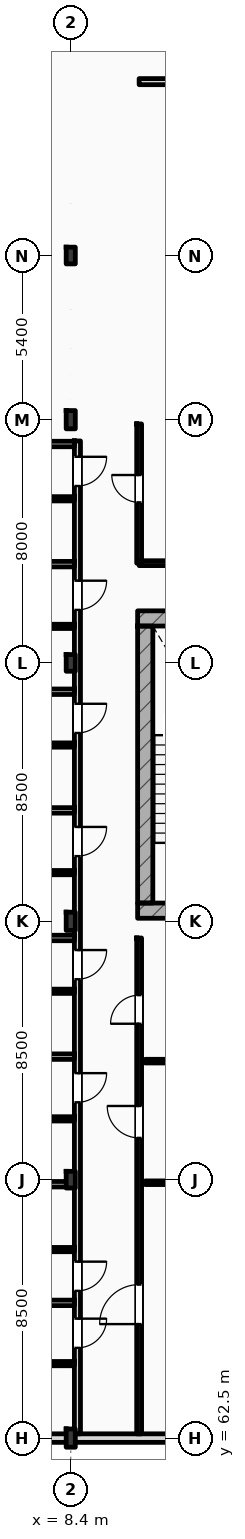
"""IFC4 building model, lengths in metres.
Left out: names, types, materials, properties, quantities, classifications, styles, units other than length and angle.
Written with IfcOpenShell. Run it as: python <this file> out.ifc"""

import sys

from ifc_helpers import new_model, si_unit, direction, frame, frame_2d, origin, origin_2d, place, context, subcontext, project, spatial, rectangle, i_section, extrude, element, fill, save


model = new_model("IFC4")
c1 = context("Model", 3, precision=1e-05, world=origin(), true_north=direction((0.0, 1.0)))
c2 = subcontext(c1, "Body", "Model", "MODEL_VIEW")
j1 = project(units=[si_unit("LENGTHUNIT", "METRE"), si_unit("PLANEANGLEUNIT", "RADIAN")], contexts=[c1])
p1 = place(None, origin())
s1 = spatial("IfcSite", under=j1, at=p1, CompositionType="ELEMENT")
p2 = place(p1, origin())
s2 = spatial("IfcBuilding", under=s1, at=p2, CompositionType="ELEMENT")
p3 = place(p2, frame((0.0, 0.0, 16.2)))
s3 = spatial("IfcBuildingStorey", under=s2, at=p3, CompositionType="ELEMENT", Elevation=16.2)
p4 = place(p3, frame((8.4, 62.5, 0.0), z_axis=(0.0, 0.0, 1.0), x_axis=(1.0, 0.0, 0.0)))
e1 = element("IfcColumn", 1, at=p4, inside=s3, PredefinedType="COLUMN", context=c2, shape_type="SweptSolid", body=[
    extrude(i_section(OverallWidth=0.3, OverallDepth=0.6, WebThickness=0.015, FlangeThickness=0.03, FilletRadius=0.027, at=origin_2d()), origin(), (0.0, 0.0, 1.0), 4.2),
])
p5 = place(p3, frame((8.4, 71.0, 0.0), z_axis=(0.0, 0.0, 1.0), x_axis=(1.0, 0.0, 0.0)))
e2 = element("IfcColumn", 2, at=p5, inside=s3, PredefinedType="COLUMN", context=c2, shape_type="SweptSolid", body=[
    extrude(i_section(OverallWidth=0.3, OverallDepth=0.55, WebThickness=0.015, FlangeThickness=0.029, FilletRadius=0.027, at=origin_2d()), origin(), (0.0, 0.0, 1.0), 4.2),
])
p6 = place(p3, frame((8.4, 79.5, 0.0), z_axis=(0.0, 0.0, 1.0), x_axis=(1.0, 0.0, 0.0)))
e3 = element("IfcColumn", 3, at=p6, inside=s3, PredefinedType="COLUMN", context=c2, shape_type="SweptSolid", body=[
    extrude(i_section(OverallWidth=0.3, OverallDepth=0.6, WebThickness=0.015, FlangeThickness=0.03, FilletRadius=0.027, at=origin_2d()), origin(), (0.0, 0.0, 1.0), 4.2),
])
p7 = place(p3, frame((8.4, 88.0, 0.0), z_axis=(0.0, 0.0, 1.0), x_axis=(1.0, 0.0, 0.0)))
e4 = element("IfcColumn", 4, at=p7, inside=s3, PredefinedType="COLUMN", context=c2, shape_type="SweptSolid", body=[
    extrude(i_section(OverallWidth=0.3, OverallDepth=0.55, WebThickness=0.015, FlangeThickness=0.029, FilletRadius=0.027, at=origin_2d()), origin(), (0.0, 0.0, 1.0), 4.2),
])
p8 = place(p3, frame((8.4, 96.0, 0.0), z_axis=(0.0, 0.0, 1.0), x_axis=(1.0, 0.0, 0.0)))
e5 = element("IfcColumn", 5, at=p8, inside=s3, PredefinedType="COLUMN", context=c2, shape_type="SweptSolid", body=[
    extrude(i_section(OverallWidth=0.3, OverallDepth=0.6, WebThickness=0.015, FlangeThickness=0.03, FilletRadius=0.027, at=origin_2d()), origin(), (0.0, 0.0, 1.0), 4.2),
])
p9 = place(p3, frame((8.4, 101.4, 0.0), z_axis=(0.0, 0.0, 1.0), x_axis=(1.0, 0.0, 0.0)))
e6 = element("IfcColumn", 6, at=p9, inside=s3, PredefinedType="COLUMN", context=c2, shape_type="SweptSolid", body=[
    extrude(i_section(OverallWidth=0.3, OverallDepth=0.55, WebThickness=0.015, FlangeThickness=0.029, FilletRadius=0.027, at=origin_2d()), origin(), (0.0, 0.0, 1.0), 4.2),
])
for number, where, z_axis, x_axis in (
    (7, (10.6, 89.462, 0.0), (0.0, 0.0, 1.0), (1.0, 0.0, 0.0)),
    (8, (10.6, 79.85, 0.0), (0.0, 0.0, 1.0), (1.0, 0.0, 0.0)),
):
    element("IfcWall", number, at=place(p3, frame(where, z_axis=z_axis, x_axis=x_axis)), inside=s3, PredefinedType="SHEAR", context=c2, shape_type="SweptSolid", body=[
        extrude(rectangle(XDim=5.16, YDim=0.5, at=frame_2d((2.58, 0.0))), origin(), (0.0, 0.0, 1.0), 4.2),
    ])
p10 = place(p3, frame((10.85, 80.1, 0.0), z_axis=(0.0, 0.0, 1.0), x_axis=(0.0, 1.0, 0.0)))
e9 = element("IfcWall", 9, at=p10, inside=s3, PredefinedType="SHEAR", context=c2, shape_type="SweptSolid", body=[
    extrude(rectangle(XDim=9.112, YDim=0.5, at=frame_2d((4.556, 0.0))), origin(), (0.0, 0.0, 1.0), 4.2),
])
p11 = place(p3, frame((0.0, 62.5, 0.0), z_axis=(0.0, 0.0, 1.0), x_axis=(1.0, 0.0, 0.0)))
e10 = element("IfcWall", 10, at=p11, inside=s3, PredefinedType="STANDARD", context=c2, shape_type="SweptSolid", body=[
    extrude(rectangle(XDim=25.2, YDim=0.28, at=frame_2d((12.6, 0.0))), origin(), (0.0, 0.0, 1.0), 3.36),
])
p12 = place(p3, frame((10.65, 107.12, 0.0), z_axis=(0.0, 0.0, 1.0), x_axis=(1.0, 0.0, 0.0)))
e11 = element("IfcWall", 11, at=p12, inside=s3, PredefinedType="PARTITIONING", context=c2, shape_type="SweptSolid", body=[
    extrude(rectangle(XDim=14.8, YDim=0.2, at=frame_2d((7.4, 0.0))), origin(), (0.0, 0.0, 1.0), 3.92),
])
p13 = place(p12, frame((8.5, 0.0, 0.0)))
e12 = element("IfcOpeningElement", 12, at=p13, cuts=e11, PredefinedType="OPENING", context=c2, shape_type="SweptSolid", body=[
    extrude(rectangle(XDim=1.25, YDim=2.15, at=frame_2d((0.625, 1.075))), frame((0.0, 0.11, 0.0), z_axis=(0.0, -1.0, 0.0), x_axis=(1.0, 0.0, 0.0)), (0.0, 0.0, 1.0), 0.22),
])
p14 = place(p3, frame((8.62, 62.64, 0.0), z_axis=(0.0, 0.0, 1.0), x_axis=(0.0, 1.0, 0.0)))
e13 = element("IfcWall", 13, at=p14, inside=s3, PredefinedType="PARTITIONING", context=c2, shape_type="SweptSolid", body=[
    extrude(rectangle(XDim=32.66, YDim=0.2, at=frame_2d((16.33, 0.0))), origin(), (0.0, 0.0, 1.0), 3.51),
])
p15 = place(p14, frame((2.829, 0.0, 0.0)))
e14 = element("IfcOpeningElement", 14, at=p15, cuts=e13, PredefinedType="OPENING", context=c2, shape_type="SweptSolid", body=[
    extrude(rectangle(XDim=0.96, YDim=2.2, at=frame_2d((0.48, 1.1))), frame((0.0, 0.11, 0.0), z_axis=(0.0, -1.0, 0.0), x_axis=(1.0, 0.0, 0.0)), (0.0, 0.0, 1.0), 0.22),
])
p16 = place(p14, frame((4.704, 0.0, 0.0)))
e15 = element("IfcOpeningElement", 15, at=p16, cuts=e13, PredefinedType="OPENING", context=c2, shape_type="SweptSolid", body=[
    extrude(rectangle(XDim=0.96, YDim=2.2, at=frame_2d((0.48, 1.1))), frame((0.0, 0.11, 0.0), z_axis=(0.0, -1.0, 0.0), x_axis=(1.0, 0.0, 0.0)), (0.0, 0.0, 1.0), 0.22),
])
p17 = place(p14, frame((10.905, 0.0, 0.0)))
e16 = element("IfcOpeningElement", 16, at=p17, cuts=e13, PredefinedType="OPENING", context=c2, shape_type="SweptSolid", body=[
    extrude(rectangle(XDim=0.96, YDim=2.2, at=frame_2d((0.48, 1.1))), frame((0.0, 0.11, 0.0), z_axis=(0.0, -1.0, 0.0), x_axis=(1.0, 0.0, 0.0)), (0.0, 0.0, 1.0), 0.22),
])
p18 = place(p14, frame((14.954, 0.0, 0.0)))
e17 = element("IfcOpeningElement", 17, at=p18, cuts=e13, PredefinedType="OPENING", context=c2, shape_type="SweptSolid", body=[
    extrude(rectangle(XDim=0.96, YDim=2.2, at=frame_2d((0.48, 1.1))), frame((0.0, 0.11, 0.0), z_axis=(0.0, -1.0, 0.0), x_axis=(1.0, 0.0, 0.0)), (0.0, 0.0, 1.0), 0.22),
])
p19 = place(p14, frame((19.004, 0.0, 0.0)))
e18 = element("IfcOpeningElement", 18, at=p19, cuts=e13, PredefinedType="OPENING", context=c2, shape_type="SweptSolid", body=[
    extrude(rectangle(XDim=0.96, YDim=2.2, at=frame_2d((0.48, 1.1))), frame((0.0, 0.11, 0.0), z_axis=(0.0, -1.0, 0.0), x_axis=(1.0, 0.0, 0.0)), (0.0, 0.0, 1.0), 0.22),
])
p20 = place(p14, frame((23.055, 0.0, 0.0)))
e19 = element("IfcOpeningElement", 19, at=p20, cuts=e13, PredefinedType="OPENING", context=c2, shape_type="SweptSolid", body=[
    extrude(rectangle(XDim=0.96, YDim=2.2, at=frame_2d((0.48, 1.1))), frame((0.0, 0.11, 0.0), z_axis=(0.0, -1.0, 0.0), x_axis=(1.0, 0.0, 0.0)), (0.0, 0.0, 1.0), 0.22),
])
p21 = place(p14, frame((27.104, 0.0, 0.0)))
e20 = element("IfcOpeningElement", 20, at=p21, cuts=e13, PredefinedType="OPENING", context=c2, shape_type="SweptSolid", body=[
    extrude(rectangle(XDim=0.96, YDim=2.2, at=frame_2d((0.48, 1.1))), frame((0.0, 0.11, 0.0), z_axis=(0.0, -1.0, 0.0), x_axis=(1.0, 0.0, 0.0)), (0.0, 0.0, 1.0), 0.22),
])
p22 = place(p14, frame((31.179, 0.0, 0.0)))
e21 = element("IfcOpeningElement", 21, at=p22, cuts=e13, PredefinedType="OPENING", context=c2, shape_type="SweptSolid", body=[
    extrude(rectangle(XDim=0.96, YDim=2.2, at=frame_2d((0.48, 1.1))), frame((0.0, 0.11, 0.0), z_axis=(0.0, -1.0, 0.0), x_axis=(1.0, 0.0, 0.0)), (0.0, 0.0, 1.0), 0.22),
])
p23 = place(p3, frame((10.65, 62.64, 0.0), z_axis=(0.0, 0.0, 1.0), x_axis=(0.0, 1.0, 0.0)))
e22 = element("IfcWall", 22, at=p23, inside=s3, PredefinedType="PARTITIONING", context=c2, shape_type="SweptSolid", body=[
    extrude(rectangle(XDim=16.31, YDim=0.16, at=frame_2d((8.155, 0.0))), origin(), (0.0, 0.0, 1.0), 3.92),
])
p24 = place(p23, frame((3.61, 0.0, 0.0)))
e23 = element("IfcOpeningElement", 23, at=p24, cuts=e22, PredefinedType="OPENING", context=c2, shape_type="SweptSolid", body=[
    extrude(rectangle(XDim=1.3, YDim=2.2, at=frame_2d((0.65, 1.1))), frame((0.0, 0.09, 0.0), z_axis=(0.0, -1.0, 0.0), x_axis=(1.0, 0.0, 0.0)), (0.0, 0.0, 1.0), 0.18),
])
p25 = place(p23, frame((9.735, 0.0, 0.0)))
e24 = element("IfcOpeningElement", 24, at=p25, cuts=e22, PredefinedType="OPENING", context=c2, shape_type="SweptSolid", body=[
    extrude(rectangle(XDim=1.05, YDim=2.12, at=frame_2d((0.525, 1.06))), frame((0.0, 0.09, 0.0), z_axis=(0.0, -1.0, 0.0), x_axis=(1.0, 0.0, 0.0)), (0.0, 0.0, 1.0), 0.18),
])
p26 = place(p23, frame((13.49, 0.0, 0.0)))
e25 = element("IfcOpeningElement", 25, at=p26, cuts=e22, PredefinedType="OPENING", context=c2, shape_type="SweptSolid", body=[
    extrude(rectangle(XDim=0.94, YDim=2.15, at=frame_2d((0.47, 1.075))), frame((0.0, 0.09, 0.0), z_axis=(0.0, -1.0, 0.0), x_axis=(1.0, 0.0, 0.0)), (0.0, 0.0, 1.0), 0.18),
])
p27 = place(p3, frame((10.65, 91.28, 0.0), z_axis=(0.0, 0.0, 1.0), x_axis=(0.0, 1.0, 0.0)))
e26 = element("IfcWall", 26, at=p27, inside=s3, PredefinedType="PARTITIONING", context=c2, shape_type="SweptSolid", body=[
    extrude(rectangle(XDim=4.58, YDim=0.16, at=frame_2d((2.29, 0.0))), origin(), (0.0, 0.0, 1.0), 3.92),
])
p28 = place(p27, frame((2.0, 0.0, 0.0)))
e27 = element("IfcOpeningElement", 27, at=p28, cuts=e26, PredefinedType="OPENING", context=c2, shape_type="SweptSolid", body=[
    extrude(rectangle(XDim=0.9, YDim=2.1, at=frame_2d((0.45, 1.05))), frame((0.0, 0.09, 0.0), z_axis=(0.0, -1.0, 0.0), x_axis=(1.0, 0.0, 0.0)), (0.0, 0.0, 1.0), 0.18),
])
p29 = place(p3, frame((10.65, 91.28, 0.0), z_axis=(0.0, 0.0, 1.0), x_axis=(1.0, 0.0, 0.0)))
e28 = element("IfcWall", 28, at=p29, inside=s3, PredefinedType="PARTITIONING", context=c2, shape_type="SweptSolid", body=[
    extrude(rectangle(XDim=6.9, YDim=0.16, at=frame_2d((3.45, 0.0))), origin(), (0.0, 0.0, 1.0), 3.92),
])
p30 = place(p3, frame((0.15, 66.948, 0.0), z_axis=(0.0, 0.0, 1.0), x_axis=(1.0, 0.0, 0.0)))
e29 = element("IfcWall", 29, at=p30, inside=s3, PredefinedType="PARTITIONING", context=c2, shape_type="SweptSolid", body=[
    extrude(rectangle(XDim=8.37, YDim=0.18, at=frame_2d((4.185, 0.0))), origin(), (0.0, 0.0, 1.0), 3.92),
])
p31 = place(p3, frame((5.05, 64.95, 0.0), z_axis=(0.0, 0.0, 1.0), x_axis=(1.0, 0.0, 0.0)))
e30 = element("IfcWall", 30, at=p31, inside=s3, PredefinedType="PARTITIONING", context=c2, shape_type="SweptSolid", body=[
    extrude(rectangle(XDim=3.47, YDim=0.14, at=frame_2d((1.735, 0.0))), origin(), (0.0, 0.0, 1.0), 3.92),
])
p32 = place(p3, frame((0.15, 70.851, 0.0), z_axis=(0.0, 0.0, 1.0), x_axis=(1.0, 0.0, 0.0)))
e31 = element("IfcWall", 31, at=p32, inside=s3, PredefinedType="PARTITIONING", context=c2, shape_type="SweptSolid", body=[
    extrude(rectangle(XDim=8.37, YDim=0.18, at=frame_2d((4.185, 0.0))), origin(), (0.0, 0.0, 1.0), 3.36),
])
p33 = place(p3, frame((5.05, 68.701, 0.0), z_axis=(0.0, 0.0, 1.0), x_axis=(1.0, 0.0, 0.0)))
e32 = element("IfcWall", 32, at=p33, inside=s3, PredefinedType="PARTITIONING", context=c2, shape_type="SweptSolid", body=[
    extrude(rectangle(XDim=3.47, YDim=0.14, at=frame_2d((1.735, 0.0))), origin(), (0.0, 0.0, 1.0), 3.92),
])
p34 = place(p3, frame((0.15, 75.048, 0.0), z_axis=(0.0, 0.0, 1.0), x_axis=(1.0, 0.0, 0.0)))
e33 = element("IfcWall", 33, at=p34, inside=s3, PredefinedType="PARTITIONING", context=c2, shape_type="SweptSolid", body=[
    extrude(rectangle(XDim=8.37, YDim=0.18, at=frame_2d((4.185, 0.0))), origin(), (0.0, 0.0, 1.0), 3.92),
])
p35 = place(p3, frame((5.05, 73.001, 0.0), z_axis=(0.0, 0.0, 1.0), x_axis=(1.0, 0.0, 0.0)))
e34 = element("IfcWall", 34, at=p35, inside=s3, PredefinedType="PARTITIONING", context=c2, shape_type="SweptSolid", body=[
    extrude(rectangle(XDim=3.47, YDim=0.14, at=frame_2d((1.735, 0.0))), origin(), (0.0, 0.0, 1.0), 3.92),
])
p36 = place(p3, frame((0.15, 78.951, 0.0), z_axis=(0.0, 0.0, 1.0), x_axis=(1.0, 0.0, 0.0)))
e35 = element("IfcWall", 35, at=p36, inside=s3, PredefinedType="PARTITIONING", context=c2, shape_type="SweptSolid", body=[
    extrude(rectangle(XDim=8.37, YDim=0.18, at=frame_2d((4.185, 0.0))), origin(), (0.0, 0.0, 1.0), 3.92),
])
p37 = place(p3, frame((5.05, 77.198, 0.0), z_axis=(0.0, 0.0, 1.0), x_axis=(1.0, 0.0, 0.0)))
e36 = element("IfcWall", 36, at=p37, inside=s3, PredefinedType="PARTITIONING", context=c2, shape_type="SweptSolid", body=[
    extrude(rectangle(XDim=3.47, YDim=0.14, at=frame_2d((1.735, 0.0))), origin(), (0.0, 0.0, 1.0), 3.92),
])
p38 = place(p3, frame((0.15, 83.148, 0.0), z_axis=(0.0, 0.0, 1.0), x_axis=(1.0, 0.0, 0.0)))
e37 = element("IfcWall", 37, at=p38, inside=s3, PredefinedType="PARTITIONING", context=c2, shape_type="SweptSolid", body=[
    extrude(rectangle(XDim=8.37, YDim=0.18, at=frame_2d((4.185, 0.0))), origin(), (0.0, 0.0, 1.0), 3.92),
])
p39 = place(p3, frame((5.05, 81.101, 0.0), z_axis=(0.0, 0.0, 1.0), x_axis=(1.0, 0.0, 0.0)))
e38 = element("IfcWall", 38, at=p39, inside=s3, PredefinedType="PARTITIONING", context=c2, shape_type="SweptSolid", body=[
    extrude(rectangle(XDim=3.47, YDim=0.14, at=frame_2d((1.735, 0.0))), origin(), (0.0, 0.0, 1.0), 3.92),
])
p40 = place(p3, frame((0.15, 87.051, 0.0), z_axis=(0.0, 0.0, 1.0), x_axis=(1.0, 0.0, 0.0)))
e39 = element("IfcWall", 39, at=p40, inside=s3, PredefinedType="PARTITIONING", context=c2, shape_type="SweptSolid", body=[
    extrude(rectangle(XDim=8.37, YDim=0.18, at=frame_2d((4.185, 0.0))), origin(), (0.0, 0.0, 1.0), 3.92),
])
p41 = place(p3, frame((5.05, 85.298, 0.0), z_axis=(0.0, 0.0, 1.0), x_axis=(1.0, 0.0, 0.0)))
e40 = element("IfcWall", 40, at=p41, inside=s3, PredefinedType="PARTITIONING", context=c2, shape_type="SweptSolid", body=[
    extrude(rectangle(XDim=3.47, YDim=0.14, at=frame_2d((1.735, 0.0))), origin(), (0.0, 0.0, 1.0), 3.92),
])
p42 = place(p3, frame((0.15, 91.248, 0.0), z_axis=(0.0, 0.0, 1.0), x_axis=(1.0, 0.0, 0.0)))
e41 = element("IfcWall", 41, at=p42, inside=s3, PredefinedType="PARTITIONING", context=c2, shape_type="SweptSolid", body=[
    extrude(rectangle(XDim=8.37, YDim=0.18, at=frame_2d((4.185, 0.0))), origin(), (0.0, 0.0, 1.0), 3.92),
])
p43 = place(p3, frame((5.05, 89.201, 0.0), z_axis=(0.0, 0.0, 1.0), x_axis=(1.0, 0.0, 0.0)))
e42 = element("IfcWall", 42, at=p43, inside=s3, PredefinedType="PARTITIONING", context=c2, shape_type="SweptSolid", body=[
    extrude(rectangle(XDim=3.47, YDim=0.14, at=frame_2d((1.735, 0.0))), origin(), (0.0, 0.0, 1.0), 3.92),
])
p44 = place(p3, frame((0.15, 95.2, 0.0), z_axis=(0.0, 0.0, 1.0), x_axis=(1.0, 0.0, 0.0)))
e43 = element("IfcWall", 43, at=p44, inside=s3, PredefinedType="PARTITIONING", context=c2, shape_type="SweptSolid", body=[
    extrude(rectangle(XDim=8.37, YDim=0.18, at=frame_2d((4.185, 0.0))), origin(), (0.0, 0.0, 1.0), 3.92),
])
p45 = place(p3, frame((5.05, 93.398, 0.0), z_axis=(0.0, 0.0, 1.0), x_axis=(1.0, 0.0, 0.0)))
e44 = element("IfcWall", 44, at=p45, inside=s3, PredefinedType="PARTITIONING", context=c2, shape_type="SweptSolid", body=[
    extrude(rectangle(XDim=3.47, YDim=0.14, at=frame_2d((1.735, 0.0))), origin(), (0.0, 0.0, 1.0), 3.92),
])
p46 = place(p3, frame((10.85, 70.9, 0.0), z_axis=(0.0, 0.0, 1.0), x_axis=(1.0, 0.0, 0.0)))
e45 = element("IfcWall", 45, at=p46, inside=s3, PredefinedType="PARTITIONING", context=c2, shape_type="SweptSolid", body=[
    extrude(rectangle(XDim=7.35, YDim=0.12, at=frame_2d((3.675, 0.0))), origin(), (0.0, 0.0, 1.0), 3.36),
])
p47 = place(p3, frame((10.85, 74.9, 0.0), z_axis=(0.0, 0.0, 1.0), x_axis=(1.0, 0.0, 0.0)))
e46 = element("IfcWall", 46, at=p47, inside=s3, PredefinedType="PARTITIONING", context=c2, shape_type="SweptSolid", body=[
    extrude(rectangle(XDim=5.35, YDim=0.12, at=frame_2d((2.675, 0.0))), origin(), (0.0, 0.0, 1.0), 3.92),
])
p48 = place(p15, frame((0.96, 0.0, 0.0), z_axis=(0.0, 0.0, 1.0), x_axis=(-1.0, 0.0, 0.0)))
e47 = element("IfcDoor", 47, at=p48, inside=s3, OperationType="SINGLE_SWING_RIGHT", PredefinedType="DOOR", context=c2, shape_type="SweptSolid", body=[
    extrude(rectangle(XDim=0.96, YDim=2.2, at=frame_2d((0.48, 1.1))), frame((0.0, 0.025, 0.0), z_axis=(0.0, -1.0, 0.0), x_axis=(1.0, 0.0, 0.0)), (0.0, 0.0, 1.0), 0.05),
])
fill(e14, e47)
p49 = place(p16, frame((0.96, 0.0, 0.0), z_axis=(0.0, 0.0, 1.0), x_axis=(-1.0, 0.0, 0.0)))
e48 = element("IfcDoor", 48, at=p49, inside=s3, OperationType="SINGLE_SWING_RIGHT", PredefinedType="DOOR", context=c2, shape_type="SweptSolid", body=[
    extrude(rectangle(XDim=0.96, YDim=2.2, at=frame_2d((0.48, 1.1))), frame((0.0, 0.025, 0.0), z_axis=(0.0, -1.0, 0.0), x_axis=(1.0, 0.0, 0.0)), (0.0, 0.0, 1.0), 0.05),
])
fill(e15, e48)
p50 = place(p17, frame((0.96, 0.0, 0.0), z_axis=(0.0, 0.0, 1.0), x_axis=(-1.0, 0.0, 0.0)))
e49 = element("IfcDoor", 49, at=p50, inside=s3, OperationType="SINGLE_SWING_RIGHT", PredefinedType="DOOR", context=c2, shape_type="SweptSolid", body=[
    extrude(rectangle(XDim=0.96, YDim=2.2, at=frame_2d((0.48, 1.1))), frame((0.0, 0.025, 0.0), z_axis=(0.0, -1.0, 0.0), x_axis=(1.0, 0.0, 0.0)), (0.0, 0.0, 1.0), 0.05),
])
fill(e16, e49)
p51 = place(p18, frame((0.96, 0.0, 0.0), z_axis=(0.0, 0.0, 1.0), x_axis=(-1.0, 0.0, 0.0)))
e50 = element("IfcDoor", 50, at=p51, inside=s3, OperationType="SINGLE_SWING_RIGHT", PredefinedType="DOOR", context=c2, shape_type="SweptSolid", body=[
    extrude(rectangle(XDim=0.96, YDim=2.2, at=frame_2d((0.48, 1.1))), frame((0.0, 0.025, 0.0), z_axis=(0.0, -1.0, 0.0), x_axis=(1.0, 0.0, 0.0)), (0.0, 0.0, 1.0), 0.05),
])
fill(e17, e50)
p52 = place(p19, frame((0.96, 0.0, 0.0), z_axis=(0.0, 0.0, 1.0), x_axis=(-1.0, 0.0, 0.0)))
e51 = element("IfcDoor", 51, at=p52, inside=s3, OperationType="SINGLE_SWING_RIGHT", PredefinedType="DOOR", context=c2, shape_type="SweptSolid", body=[
    extrude(rectangle(XDim=0.96, YDim=2.2, at=frame_2d((0.48, 1.1))), frame((0.0, 0.025, 0.0), z_axis=(0.0, -1.0, 0.0), x_axis=(1.0, 0.0, 0.0)), (0.0, 0.0, 1.0), 0.05),
])
fill(e18, e51)
p53 = place(p20, frame((0.96, 0.0, 0.0), z_axis=(0.0, 0.0, 1.0), x_axis=(-1.0, 0.0, 0.0)))
e52 = element("IfcDoor", 52, at=p53, inside=s3, OperationType="SINGLE_SWING_RIGHT", PredefinedType="DOOR", context=c2, shape_type="SweptSolid", body=[
    extrude(rectangle(XDim=0.96, YDim=2.2, at=frame_2d((0.48, 1.1))), frame((0.0, 0.025, 0.0), z_axis=(0.0, -1.0, 0.0), x_axis=(1.0, 0.0, 0.0)), (0.0, 0.0, 1.0), 0.05),
])
fill(e19, e52)
p54 = place(p21, frame((0.96, 0.0, 0.0), z_axis=(0.0, 0.0, 1.0), x_axis=(-1.0, 0.0, 0.0)))
e53 = element("IfcDoor", 53, at=p54, inside=s3, OperationType="SINGLE_SWING_RIGHT", PredefinedType="DOOR", context=c2, shape_type="SweptSolid", body=[
    extrude(rectangle(XDim=0.96, YDim=2.2, at=frame_2d((0.48, 1.1))), frame((0.0, 0.025, 0.0), z_axis=(0.0, -1.0, 0.0), x_axis=(1.0, 0.0, 0.0)), (0.0, 0.0, 1.0), 0.05),
])
fill(e20, e53)
p55 = place(p22, frame((0.96, 0.0, 0.0), z_axis=(0.0, 0.0, 1.0), x_axis=(-1.0, 0.0, 0.0)))
e54 = element("IfcDoor", 54, at=p55, inside=s3, OperationType="SINGLE_SWING_RIGHT", PredefinedType="DOOR", context=c2, shape_type="SweptSolid", body=[
    extrude(rectangle(XDim=0.96, YDim=2.2, at=frame_2d((0.48, 1.1))), frame((0.0, 0.025, 0.0), z_axis=(0.0, -1.0, 0.0), x_axis=(1.0, 0.0, 0.0)), (0.0, 0.0, 1.0), 0.05),
])
fill(e21, e54)
p56 = place(p24, origin())
e55 = element("IfcDoor", 55, at=p56, inside=s3, OperationType="SINGLE_SWING_LEFT", PredefinedType="DOOR", context=c2, shape_type="SweptSolid", body=[
    extrude(rectangle(XDim=1.3, YDim=2.2, at=frame_2d((0.65, 1.1))), frame((0.0, 0.025, 0.0), z_axis=(0.0, -1.0, 0.0), x_axis=(1.0, 0.0, 0.0)), (0.0, 0.0, 1.0), 0.05),
])
fill(e23, e55)
p57 = place(p25, origin())
e56 = element("IfcDoor", 56, at=p57, inside=s3, OperationType="SINGLE_SWING_RIGHT", PredefinedType="DOOR", context=c2, shape_type="SweptSolid", body=[
    extrude(rectangle(XDim=1.05, YDim=2.12, at=frame_2d((0.525, 1.06))), frame((0.0, 0.025, 0.0), z_axis=(0.0, -1.0, 0.0), x_axis=(1.0, 0.0, 0.0)), (0.0, 0.0, 1.0), 0.05),
])
fill(e24, e56)
p58 = place(p26, origin())
e57 = element("IfcDoor", 57, at=p58, inside=s3, OperationType="SINGLE_SWING_LEFT", PredefinedType="DOOR", context=c2, shape_type="SweptSolid", body=[
    extrude(rectangle(XDim=0.94, YDim=2.15, at=frame_2d((0.47, 1.075))), frame((0.0, 0.025, 0.0), z_axis=(0.0, -1.0, 0.0), x_axis=(1.0, 0.0, 0.0)), (0.0, 0.0, 1.0), 0.05),
])
fill(e25, e57)
p59 = place(p28, origin())
e58 = element("IfcDoor", 58, at=p59, inside=s3, OperationType="SINGLE_SWING_RIGHT", PredefinedType="DOOR", context=c2, shape_type="SweptSolid", body=[
    extrude(rectangle(XDim=0.9, YDim=2.1, at=frame_2d((0.45, 1.05))), frame((0.0, 0.025, 0.0), z_axis=(0.0, -1.0, 0.0), x_axis=(1.0, 0.0, 0.0)), (0.0, 0.0, 1.0), 0.05),
])
fill(e27, e58)
save(model, sys.argv[1])
